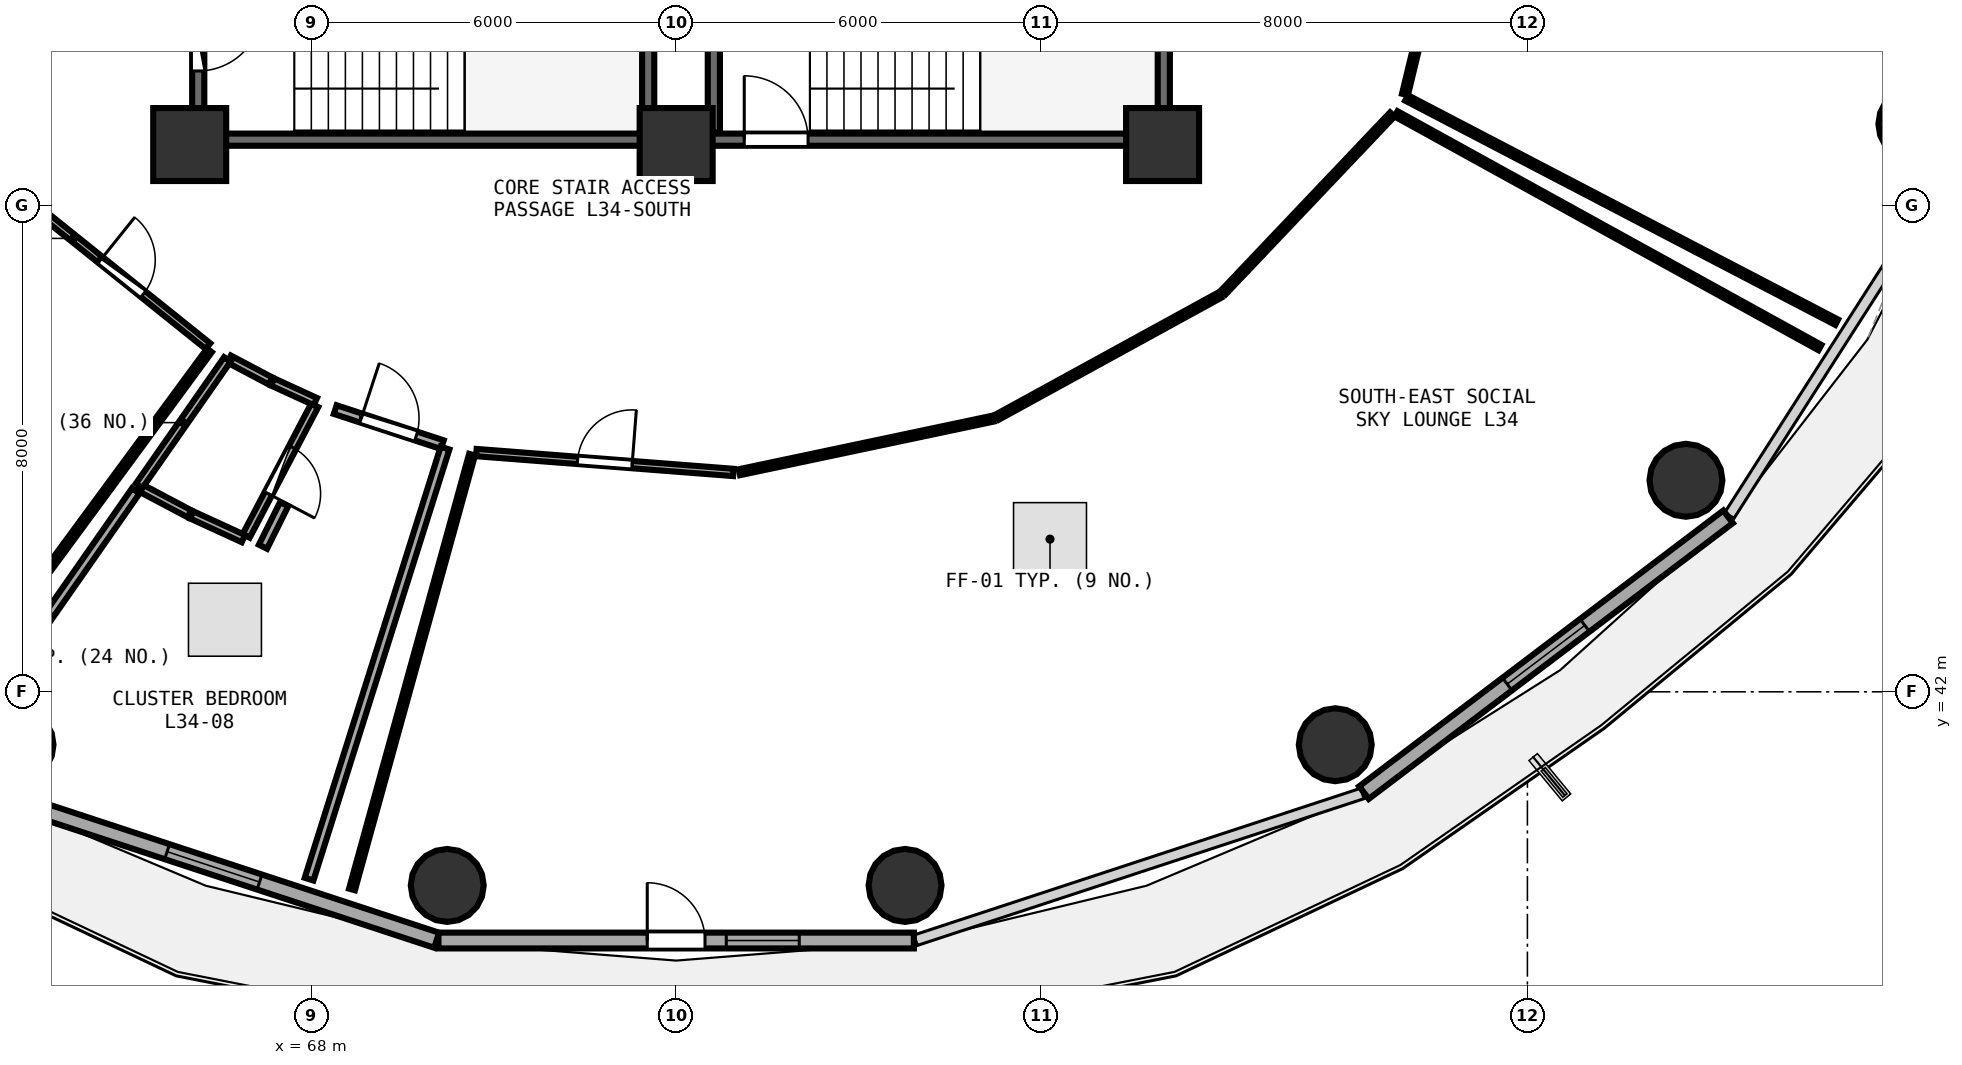
"""IFC4 building model, lengths in metres.
Left out: names, types, materials, properties, quantities, classifications, styles, units other than length and angle.
Written with IfcOpenShell. Run it as: python <this file> out.ifc"""

import sys

from ifc_helpers import new_model, si_unit, direction, frame, frame_2d, origin, origin_2d, place, context, subcontext, project, spatial, rectangle, circle, extrude, element, fill, save


model = new_model("IFC4")
c1 = context("Model", 3, precision=1e-05, world=origin(), true_north=direction((0.0, 1.0)))
c2 = subcontext(c1, "Body", "Model", "MODEL_VIEW")
j1 = project(units=[si_unit("LENGTHUNIT", "METRE"), si_unit("PLANEANGLEUNIT", "RADIAN")], contexts=[c1])
p1 = place(None, origin())
s1 = spatial("IfcSite", under=j1, at=p1, CompositionType="ELEMENT")
p2 = place(p1, origin())
s2 = spatial("IfcBuilding", under=s1, at=p2, CompositionType="ELEMENT")
p3 = place(p2, frame((0.0, 0.0, 135.6)))
s3 = spatial("IfcBuildingStorey", under=s2, at=p3, CompositionType="ELEMENT", Elevation=135.6)
for number, where, z_axis, x_axis in (
    (1, (66.0, 51.0, 0.0), (0.0, 0.0, 1.0), (1.0, 0.0, 0.0)),
    (2, (74.0, 51.0, 0.0), (0.0, 0.0, 1.0), (1.0, 0.0, 0.0)),
    (3, (82.0, 51.0, 0.0), (0.0, 0.0, 1.0), (1.0, 0.0, 0.0)),
):
    element("IfcColumn", number, at=place(p3, frame(where, z_axis=z_axis, x_axis=x_axis)), inside=s3, PredefinedType="PILASTER", context=c2, shape_type="SweptSolid", body=[
        extrude(rectangle(XDim=1.2, YDim=1.2, at=origin_2d()), origin(), (0.0, 0.0, 1.0), 3.75),
    ])
for number, where, z_axis, x_axis in (
    (4, (63.16, 41.13, 0.0), (0.0, 0.0, 1.0), (1.0, 0.0, 0.0)),
    (5, (70.235, 38.816, 0.0), (0.0, 0.0, 1.0), (1.0, 0.0, 0.0)),
    (6, (77.765, 38.816, 0.0), (0.0, 0.0, 1.0), (1.0, 0.0, 0.0)),
    (7, (84.84, 41.13, 0.0), (0.0, 0.0, 1.0), (1.0, 0.0, 0.0)),
    (8, (90.608, 45.479, 0.0), (0.0, 0.0, 1.0), (1.0, 0.0, 0.0)),
    (9, (94.373, 51.337, 0.0), (0.0, 0.0, 1.0), (1.0, 0.0, 0.0)),
):
    element("IfcColumn", number, at=place(p3, frame(where, z_axis=z_axis, x_axis=x_axis)), inside=s3, PredefinedType="COLUMN", context=c2, shape_type="SweptSolid", body=[
        extrude(circle(Radius=0.6, at=origin_2d()), origin(), (0.0, 0.0, 1.0), 3.75),
    ])
p4 = place(p3, frame((62.714, 40.328, 0.0), z_axis=(0.0, 0.0, 1.0), x_axis=(0.950038302428, -0.312133343173, 0.0)))
e10 = element("IfcWall", 10, at=p4, inside=s3, PredefinedType="SOLIDWALL", context=c2, shape_type="SweptSolid", body=[
    extrude(rectangle(XDim=7.733, YDim=0.26, at=frame_2d((3.867, 0.0))), origin(), (0.0, 0.0, 1.0), 3.475),
])
p5 = place(p4, frame((3.067, 0.0, 0.85)))
e11 = element("IfcOpeningElement", 11, at=p5, cuts=e10, PredefinedType="OPENING", context=c2, shape_type="SweptSolid", body=[
    extrude(rectangle(XDim=1.6, YDim=1.45, at=frame_2d((0.8, 0.725))), frame((0.0, 0.14, 0.0), z_axis=(0.0, -1.0, 0.0), x_axis=(1.0, 0.0, 0.0)), (0.0, 0.0, 1.0), 0.28),
])
p6 = place(p3, frame((70.091, 37.91, 0.0), z_axis=(0.0, 0.0, 1.0), x_axis=(1.0, 0.0, 0.0)))
e12 = element("IfcWall", 12, at=p6, inside=s3, PredefinedType="SOLIDWALL", context=c2, shape_type="SweptSolid", body=[
    extrude(rectangle(XDim=7.819, YDim=0.26, at=frame_2d((3.909, 0.0))), origin(), (0.0, 0.0, 1.0), 3.475),
])
p7 = place(p6, frame((3.434, 0.0, 0.0)))
e13 = element("IfcOpeningElement", 13, at=p7, cuts=e12, PredefinedType="OPENING", context=c2, shape_type="SweptSolid", body=[
    extrude(rectangle(XDim=0.95, YDim=2.1, at=frame_2d((0.475, 1.05))), frame((0.0, 0.14, 0.0), z_axis=(0.0, -1.0, 0.0), x_axis=(1.0, 0.0, 0.0)), (0.0, 0.0, 1.0), 0.28),
])
p8 = place(p6, frame((4.734, 0.0, 0.85)))
e14 = element("IfcOpeningElement", 14, at=p8, cuts=e12, PredefinedType="OPENING", context=c2, shape_type="SweptSolid", body=[
    extrude(rectangle(XDim=1.2, YDim=1.45, at=frame_2d((0.6, 0.725))), frame((0.0, 0.14, 0.0), z_axis=(0.0, -1.0, 0.0), x_axis=(1.0, 0.0, 0.0)), (0.0, 0.0, 1.0), 0.28),
])
p9 = place(p3, frame((85.312, 40.342, 0.0), z_axis=(0.0, 0.0, 1.0), x_axis=(0.797163719609, 0.603763202042, 0.0)))
e15 = element("IfcWall", 15, at=p9, inside=s3, PredefinedType="SOLIDWALL", context=c2, shape_type="SweptSolid", body=[
    extrude(rectangle(XDim=7.512, YDim=0.26, at=frame_2d((3.756, 0.0))), origin(), (0.0, 0.0, 1.0), 3.475),
])
p10 = place(p9, frame((2.956, 0.0, 0.85)))
e16 = element("IfcOpeningElement", 16, at=p10, cuts=e15, PredefinedType="OPENING", context=c2, shape_type="SweptSolid", body=[
    extrude(rectangle(XDim=1.6, YDim=1.45, at=frame_2d((0.8, 0.725))), frame((0.0, 0.14, 0.0), z_axis=(0.0, -1.0, 0.0), x_axis=(1.0, 0.0, 0.0)), (0.0, 0.0, 1.0), 0.28),
])
p11 = place(p3, frame((74.0, 51.08, 0.0), z_axis=(0.0, 0.0, 1.0), x_axis=(1.0, 0.0, 0.0)))
e17 = element("IfcWall", 17, at=p11, inside=s3, PredefinedType="SHEAR", context=c2, shape_type="SweptSolid", body=[
    extrude(rectangle(XDim=7.9, YDim=0.2, at=frame_2d((3.95, 0.0))), origin(), (0.0, 0.0, 1.0), 3.49),
])
p12 = place(p11, frame((1.12, 0.0, 0.0)))
e18 = element("IfcOpeningElement", 18, at=p12, cuts=e17, PredefinedType="OPENING", context=c2, shape_type="SweptSolid", body=[
    extrude(rectangle(XDim=1.05, YDim=2.1, at=frame_2d((0.525, 1.05))), frame((0.0, 0.11, 0.0), z_axis=(0.0, -1.0, 0.0), x_axis=(1.0, 0.0, 0.0)), (0.0, 0.0, 1.0), 0.22),
])
for number, where, z_axis, x_axis in (
    (19, (82.02, 51.2, 0.0), (0.0, 0.0, 1.0), (0.0, 1.0, 0.0)),
    (20, (74.62, 54.27, 0.0), (0.0, 0.0, 1.0), (0.0, -1.0, 0.0)),
):
    element("IfcWall", number, at=place(p3, frame(where, z_axis=z_axis, x_axis=x_axis)), inside=s3, PredefinedType="SHEAR", context=c2, shape_type="SweptSolid", body=[
        extrude(rectangle(XDim=3.07, YDim=0.2, at=frame_2d((1.535, 0.0))), origin(), (0.0, 0.0, 1.0), 3.49),
    ])
p13 = place(p3, frame((66.26, 51.08, 0.0), z_axis=(0.0, 0.0, 1.0), x_axis=(1.0, 0.0, 0.0)))
e21 = element("IfcWall", 21, at=p13, inside=s3, PredefinedType="SHEAR", context=c2, shape_type="SweptSolid", body=[
    extrude(rectangle(XDim=7.16, YDim=0.2, at=frame_2d((3.58, 0.0))), origin(), (0.0, 0.0, 1.0), 3.49),
])
p14 = place(p3, frame((73.54, 51.2, 0.0), z_axis=(0.0, 0.0, 1.0), x_axis=(0.0, 1.0, 0.0)))
e22 = element("IfcWall", 22, at=p14, inside=s3, PredefinedType="SHEAR", context=c2, shape_type="SweptSolid", body=[
    extrude(rectangle(XDim=3.07, YDim=0.2, at=frame_2d((1.535, 0.0))), origin(), (0.0, 0.0, 1.0), 3.49),
])
p15 = place(p3, frame((66.14, 54.27, 0.0), z_axis=(0.0, 0.0, 1.0), x_axis=(0.0, -1.0, 0.0)))
e23 = element("IfcWall", 23, at=p15, inside=s3, PredefinedType="SHEAR", context=c2, shape_type="SweptSolid", body=[
    extrude(rectangle(XDim=3.07, YDim=0.2, at=frame_2d((1.535, 0.0))), origin(), (0.0, 0.0, 1.0), 3.49),
])
p16 = place(p15, frame((1.01, 0.0, 0.0)))
e24 = element("IfcOpeningElement", 24, at=p16, cuts=e23, PredefinedType="OPENING", context=c2, shape_type="SweptSolid", body=[
    extrude(rectangle(XDim=1.05, YDim=2.1, at=frame_2d((0.525, 1.05))), frame((0.0, 0.11, 0.0), z_axis=(0.0, -1.0, 0.0), x_axis=(1.0, 0.0, 0.0)), (0.0, 0.0, 1.0), 0.22),
])
p17 = place(p3, frame((70.714, 45.934, 0.0), z_axis=(0.0, 0.0, 1.0), x_axis=(0.99702766625, -0.077044355613, 0.0)))
e25 = element("IfcWall", 25, at=p17, inside=s3, PredefinedType="PARTITIONING", context=c2, shape_type="SweptSolid", body=[
    extrude(rectangle(XDim=4.24, YDim=0.12, at=frame_2d((2.12, 0.0))), origin(), (0.0, 0.0, 1.0), 2.975),
])
p18 = place(p17, frame((1.67, 0.0, 0.0)))
e26 = element("IfcOpeningElement", 26, at=p18, cuts=e25, PredefinedType="OPENING", context=c2, shape_type="SweptSolid", body=[
    extrude(rectangle(XDim=0.9, YDim=2.08, at=frame_2d((0.45, 1.04))), frame((0.0, 0.07, 0.0), z_axis=(0.0, -1.0, 0.0), x_axis=(1.0, 0.0, 0.0)), (0.0, 0.0, 1.0), 0.14),
])
p19 = place(p3, frame((63.468, 49.957, 0.0), z_axis=(0.0, 0.0, 1.0), x_axis=(0.78006790059, -0.625694870099, 0.0)))
e27 = element("IfcWall", 27, at=p19, inside=s3, PredefinedType="PARTITIONING", context=c2, shape_type="SweptSolid", body=[
    extrude(rectangle(XDim=3.631, YDim=0.12, at=frame_2d((1.815, 0.0))), origin(), (0.0, 0.0, 1.0), 2.975),
])
p20 = place(p19, frame((1.366, 0.0, 0.0)))
e28 = element("IfcOpeningElement", 28, at=p20, cuts=e27, PredefinedType="OPENING", context=c2, shape_type="SweptSolid", body=[
    extrude(rectangle(XDim=0.9, YDim=2.08, at=frame_2d((0.45, 1.04))), frame((0.0, 0.07, 0.0), z_axis=(0.0, -1.0, 0.0), x_axis=(1.0, 0.0, 0.0)), (0.0, 0.0, 1.0), 0.14),
])
p21 = place(p3, frame((68.056, 46.712, 0.0), z_axis=(0.0, 0.0, 1.0), x_axis=(-0.464721454244, -0.885456927222, 0.0)))
e29 = element("IfcWall", 29, at=p21, inside=s3, PredefinedType="PLUMBINGWALL", context=c2, shape_type="SweptSolid", body=[
    extrude(rectangle(XDim=2.426, YDim=0.13, at=frame_2d((1.213, 0.0))), origin(), (0.0, 0.0, 1.0), 3.175),
])
p22 = place(p21, frame((0.783, 0.0, 0.0)))
e30 = element("IfcOpeningElement", 30, at=p22, cuts=e29, PredefinedType="OPENING", context=c2, shape_type="SweptSolid", body=[
    extrude(rectangle(XDim=0.86, YDim=2.05, at=frame_2d((0.43, 1.025))), frame((0.0, 0.075, 0.0), z_axis=(0.0, -1.0, 0.0), x_axis=(1.0, 0.0, 0.0)), (0.0, 0.0, 1.0), 0.15),
])
p23 = place(p3, frame((68.393, 46.641, 0.0), z_axis=(0.0, 0.0, 1.0), x_axis=(0.950343295829, -0.311203502668, 0.0)))
e31 = element("IfcWall", 31, at=p23, inside=s3, PredefinedType="PARTITIONING", context=c2, shape_type="SweptSolid", body=[
    extrude(rectangle(XDim=1.853, YDim=0.15, at=frame_2d((0.927, 0.0))), origin(), (0.0, 0.0, 1.0), 3.48),
])
p24 = place(p23, frame((0.451, 0.0, 0.0)))
e32 = element("IfcOpeningElement", 32, at=p24, cuts=e31, PredefinedType="OPENING", context=c2, shape_type="SweptSolid", body=[
    extrude(rectangle(XDim=0.95, YDim=2.08, at=frame_2d((0.475, 1.04))), frame((0.0, 0.085, 0.0), z_axis=(0.0, -1.0, 0.0), x_axis=(1.0, 0.0, 0.0)), (0.0, 0.0, 1.0), 0.17),
])
p25 = place(p3, frame((75.04, 45.611, 0.0), z_axis=(0.0, 0.0, 1.0), x_axis=(0.978421930287, 0.206616858785, 0.0)))
e33 = element("IfcWall", 33, at=p25, inside=s3, PredefinedType="PARTITIONING", context=c2, shape_type="SweptSolid", body=[
    extrude(rectangle(XDim=4.261, YDim=0.1, at=frame_2d((2.13, 0.0))), origin(), (0.0, 0.0, 1.0), 2.975),
])
p26 = place(p3, frame((79.283, 46.519, 0.0), z_axis=(0.0, 0.0, 1.0), x_axis=(0.876994001609, 0.480501322726, 0.0)))
e34 = element("IfcWall", 34, at=p26, inside=s3, PredefinedType="PARTITIONING", context=c2, shape_type="SweptSolid", body=[
    extrude(rectangle(XDim=4.167, YDim=0.1, at=frame_2d((2.084, 0.0))), origin(), (0.0, 0.0, 1.0), 2.975),
])
p27 = place(p3, frame((83.0, 48.57, 0.0), z_axis=(0.0, 0.0, 1.0), x_axis=(0.688528308603, 0.725209465088, 0.0)))
e35 = element("IfcWall", 35, at=p27, inside=s3, PredefinedType="PARTITIONING", context=c2, shape_type="SweptSolid", body=[
    extrude(rectangle(XDim=4.033, YDim=0.1, at=frame_2d((2.017, 0.0))), origin(), (0.0, 0.0, 1.0), 2.975),
])
p28 = place(p3, frame((85.84, 51.505, 0.0), z_axis=(0.0, 0.0, 1.0), x_axis=(0.875725262543, -0.482809760199, 0.0)))
e36 = element("IfcWall", 36, at=p28, inside=s3, PredefinedType="PARTITIONING", context=c2, shape_type="SweptSolid", body=[
    extrude(rectangle(XDim=7.96, YDim=0.1, at=frame_2d((3.98, 0.0))), origin(), (0.0, 0.0, 1.0), 2.975),
])
p29 = place(p3, frame((68.669, 38.75, 0.0), z_axis=(0.0, 0.0, 1.0), x_axis=(0.26617364863, 0.963925095002, 0.0)))
e37 = element("IfcWall", 37, at=p29, inside=s3, PredefinedType="PARTITIONING", context=c2, shape_type="SweptSolid", body=[
    extrude(rectangle(XDim=7.418, YDim=0.1, at=frame_2d((3.709, 0.0))), origin(), (0.0, 0.0, 1.0), 3.025),
])
p30 = place(p3, frame((85.986, 51.824, 0.0), z_axis=(0.0, 0.0, 1.0), x_axis=(0.234816749424, 0.972039656696, 0.0)))
e38 = element("IfcWall", 38, at=p30, inside=s3, PredefinedType="PARTITIONING", context=c2, shape_type="SweptSolid", body=[
    extrude(rectangle(XDim=7.539, YDim=0.1, at=frame_2d((3.77, 0.0))), origin(), (0.0, 0.0, 1.0), 2.975),
])
p31 = place(p3, frame((93.086, 48.079, 0.0), z_axis=(0.0, 0.0, 1.0), x_axis=(-0.886727770337, 0.462291965443, 0.0)))
e39 = element("IfcWall", 39, at=p31, inside=s3, PredefinedType="PARTITIONING", context=c2, shape_type="SweptSolid", body=[
    extrude(rectangle(XDim=7.978, YDim=0.1, at=frame_2d((3.989, 0.0))), origin(), (0.0, 0.0, 1.0), 2.975),
])
p32 = place(p3, frame((66.323, 47.615, 0.0), z_axis=(0.0, 0.0, 1.0), x_axis=(-0.592678959784, -0.805438793845, 0.0)))
e40 = element("IfcWall", 40, at=p32, inside=s3, PredefinedType="PARTITIONING", context=c2, shape_type="SweptSolid", body=[
    extrude(rectangle(XDim=7.624, YDim=0.1, at=frame_2d((3.812, 0.0))), origin(), (0.0, 0.0, 1.0), 2.975),
])
p33 = place(p3, frame((66.648, 47.473, 0.0), z_axis=(0.0, 0.0, 1.0), x_axis=(0.884034960309, -0.467420783611, 0.0)))
e41 = element("IfcWall", 41, at=p33, inside=s3, PredefinedType="PLUMBINGWALL", context=c2, shape_type="SweptSolid", body=[
    extrude(rectangle(XDim=0.769, YDim=0.13, at=frame_2d((0.384, 0.0))), origin(), (0.0, 0.0, 1.0), 3.235),
])
p34 = place(p3, frame((67.363, 47.096, 0.0), z_axis=(0.0, 0.0, 1.0), x_axis=(0.908835433781, -0.417154832531, 0.0)))
e42 = element("IfcWall", 42, at=p34, inside=s3, PredefinedType="PLUMBINGWALL", context=c2, shape_type="SweptSolid", body=[
    extrude(rectangle(XDim=0.773, YDim=0.13, at=frame_2d((0.387, 0.0))), origin(), (0.0, 0.0, 1.0), 3.235),
])
p35 = place(p3, frame((66.883, 44.519, 0.0), z_axis=(0.0, 0.0, 1.0), x_axis=(-0.90885062215, 0.417121740763, 0.0)))
e43 = element("IfcWall", 43, at=p35, inside=s3, PredefinedType="PLUMBINGWALL", context=c2, shape_type="SweptSolid", body=[
    extrude(rectangle(XDim=0.936, YDim=0.13, at=frame_2d((0.468, 0.0))), origin(), (0.0, 0.0, 1.0), 3.175),
])
p36 = place(p3, frame((65.996, 44.927, 0.0), z_axis=(0.0, 0.0, 1.0), x_axis=(-0.88373041627, 0.46799631554, 0.0)))
e44 = element("IfcWall", 44, at=p36, inside=s3, PredefinedType="PLUMBINGWALL", context=c2, shape_type="SweptSolid", body=[
    extrude(rectangle(XDim=0.93, YDim=0.13, at=frame_2d((0.465, 0.0))), origin(), (0.0, 0.0, 1.0), 3.175),
])
p37 = place(p3, frame((65.168, 45.388, 0.0), z_axis=(0.0, 0.0, 1.0), x_axis=(0.572452908282, 0.819937599943, 0.0)))
e45 = element("IfcWall", 45, at=p37, inside=s3, PredefinedType="PLUMBINGWALL", context=c2, shape_type="SweptSolid", body=[
    extrude(rectangle(XDim=2.533, YDim=0.13, at=frame_2d((1.267, 0.0))), origin(), (0.0, 0.0, 1.0), 3.235),
])
p38 = place(p3, frame((70.199, 46.008, 0.0), z_axis=(0.0, 0.0, 1.0), x_axis=(-0.300834252316, -0.953676440222, 0.0)))
e46 = element("IfcWall", 46, at=p38, inside=s3, PredefinedType="PARTITIONING", context=c2, shape_type="SweptSolid", body=[
    extrude(rectangle(XDim=7.433, YDim=0.15, at=frame_2d((3.716, 0.0))), origin(), (0.0, 0.0, 1.0), 3.025),
])
p39 = place(p3, frame((62.257, 41.211, 0.0), z_axis=(0.0, 0.0, 1.0), x_axis=(0.572125752908, 0.820165911789, 0.0)))
e47 = element("IfcWall", 47, at=p39, inside=s3, PredefinedType="PARTITIONING", context=c2, shape_type="SweptSolid", body=[
    extrude(rectangle(XDim=4.992, YDim=0.15, at=frame_2d((2.496, 0.0))), origin(), (0.0, 0.0, 1.0), 2.975),
])
p40 = place(p3, frame((67.205, 44.386, 0.0), z_axis=(0.0, 0.0, 1.0), x_axis=(0.445215718224, 0.89542334359, 0.0)))
e48 = element("IfcWall", 48, at=p40, inside=s3, PredefinedType="PARTITIONING", context=c2, shape_type="SweptSolid", body=[
    extrude(rectangle(XDim=0.782, YDim=0.15, at=frame_2d((0.391, 0.0))), origin(), (0.0, 0.0, 1.0), 3.175),
])
p41 = place(p5, origin())
e49 = element("IfcWindow", 49, at=p41, inside=s3, PartitioningType="SINGLE_PANEL", PredefinedType="WINDOW", context=c2, shape_type="SweptSolid", body=[
    extrude(rectangle(XDim=1.6, YDim=1.45, at=frame_2d((0.8, 0.725))), frame((0.0, 0.03, 0.0), z_axis=(0.0, -1.0, 0.0), x_axis=(1.0, 0.0, 0.0)), (0.0, 0.0, 1.0), 0.06),
])
fill(e11, e49)
p42 = place(p7, frame((0.95, 0.0, 0.0), z_axis=(0.0, 0.0, 1.0), x_axis=(-1.0, 0.0, 0.0)))
e50 = element("IfcDoor", 50, at=p42, inside=s3, OperationType="SINGLE_SWING_RIGHT", PredefinedType="DOOR", context=c2, shape_type="SweptSolid", body=[
    extrude(rectangle(XDim=0.95, YDim=2.1, at=frame_2d((0.475, 1.05))), frame((0.0, 0.025, 0.0), z_axis=(0.0, -1.0, 0.0), x_axis=(1.0, 0.0, 0.0)), (0.0, 0.0, 1.0), 0.05),
])
fill(e13, e50)
p43 = place(p8, origin())
e51 = element("IfcWindow", 51, at=p43, inside=s3, PartitioningType="SINGLE_PANEL", PredefinedType="WINDOW", context=c2, shape_type="SweptSolid", body=[
    extrude(rectangle(XDim=1.2, YDim=1.45, at=frame_2d((0.6, 0.725))), frame((0.0, 0.03, 0.0), z_axis=(0.0, -1.0, 0.0), x_axis=(1.0, 0.0, 0.0)), (0.0, 0.0, 1.0), 0.06),
])
fill(e14, e51)
p44 = place(p10, origin())
e52 = element("IfcWindow", 52, at=p44, inside=s3, PartitioningType="SINGLE_PANEL", PredefinedType="WINDOW", context=c2, shape_type="SweptSolid", body=[
    extrude(rectangle(XDim=1.6, YDim=1.45, at=frame_2d((0.8, 0.725))), frame((0.0, 0.03, 0.0), z_axis=(0.0, -1.0, 0.0), x_axis=(1.0, 0.0, 0.0)), (0.0, 0.0, 1.0), 0.06),
])
fill(e16, e52)
p45 = place(p12, origin())
e53 = element("IfcDoor", 53, at=p45, inside=s3, OperationType="SINGLE_SWING_LEFT", PredefinedType="DOOR", context=c2, shape_type="SweptSolid", body=[
    extrude(rectangle(XDim=1.05, YDim=2.1, at=frame_2d((0.525, 1.05))), frame((0.0, 0.025, 0.0), z_axis=(0.0, -1.0, 0.0), x_axis=(1.0, 0.0, 0.0)), (0.0, 0.0, 1.0), 0.05),
])
fill(e18, e53)
p46 = place(p16, origin())
e54 = element("IfcDoor", 54, at=p46, inside=s3, OperationType="SINGLE_SWING_LEFT", PredefinedType="DOOR", context=c2, shape_type="SweptSolid", body=[
    extrude(rectangle(XDim=1.05, YDim=2.1, at=frame_2d((0.525, 1.05))), frame((0.0, 0.025, 0.0), z_axis=(0.0, -1.0, 0.0), x_axis=(1.0, 0.0, 0.0)), (0.0, 0.0, 1.0), 0.05),
])
fill(e24, e54)
p47 = place(p18, origin())
e55 = element("IfcDoor", 55, at=p47, inside=s3, OperationType="SINGLE_SWING_RIGHT", PredefinedType="DOOR", context=c2, shape_type="SweptSolid", body=[
    extrude(rectangle(XDim=0.9, YDim=2.08, at=frame_2d((0.45, 1.04))), frame((0.0, 0.025, 0.0), z_axis=(0.0, -1.0, 0.0), x_axis=(1.0, 0.0, 0.0)), (0.0, 0.0, 1.0), 0.05),
])
fill(e26, e55)
p48 = place(p20, origin())
e56 = element("IfcDoor", 56, at=p48, inside=s3, OperationType="SINGLE_SWING_LEFT", PredefinedType="DOOR", context=c2, shape_type="SweptSolid", body=[
    extrude(rectangle(XDim=0.9, YDim=2.08, at=frame_2d((0.45, 1.04))), frame((0.0, 0.025, 0.0), z_axis=(0.0, -1.0, 0.0), x_axis=(1.0, 0.0, 0.0)), (0.0, 0.0, 1.0), 0.05),
])
fill(e28, e56)
p49 = place(p22, origin())
e57 = element("IfcDoor", 57, at=p49, inside=s3, OperationType="SINGLE_SWING_RIGHT", PredefinedType="DOOR", context=c2, shape_type="SweptSolid", body=[
    extrude(rectangle(XDim=0.86, YDim=2.05, at=frame_2d((0.43, 1.025))), frame((0.0, 0.025, 0.0), z_axis=(0.0, -1.0, 0.0), x_axis=(1.0, 0.0, 0.0)), (0.0, 0.0, 1.0), 0.05),
])
fill(e30, e57)
p50 = place(p24, origin())
e58 = element("IfcDoor", 58, at=p50, inside=s3, OperationType="SINGLE_SWING_LEFT", PredefinedType="DOOR", context=c2, shape_type="SweptSolid", body=[
    extrude(rectangle(XDim=0.95, YDim=2.08, at=frame_2d((0.475, 1.04))), frame((0.0, 0.025, 0.0), z_axis=(0.0, -1.0, 0.0), x_axis=(1.0, 0.0, 0.0)), (0.0, 0.0, 1.0), 0.05),
])
fill(e32, e58)
save(model, sys.argv[1])
